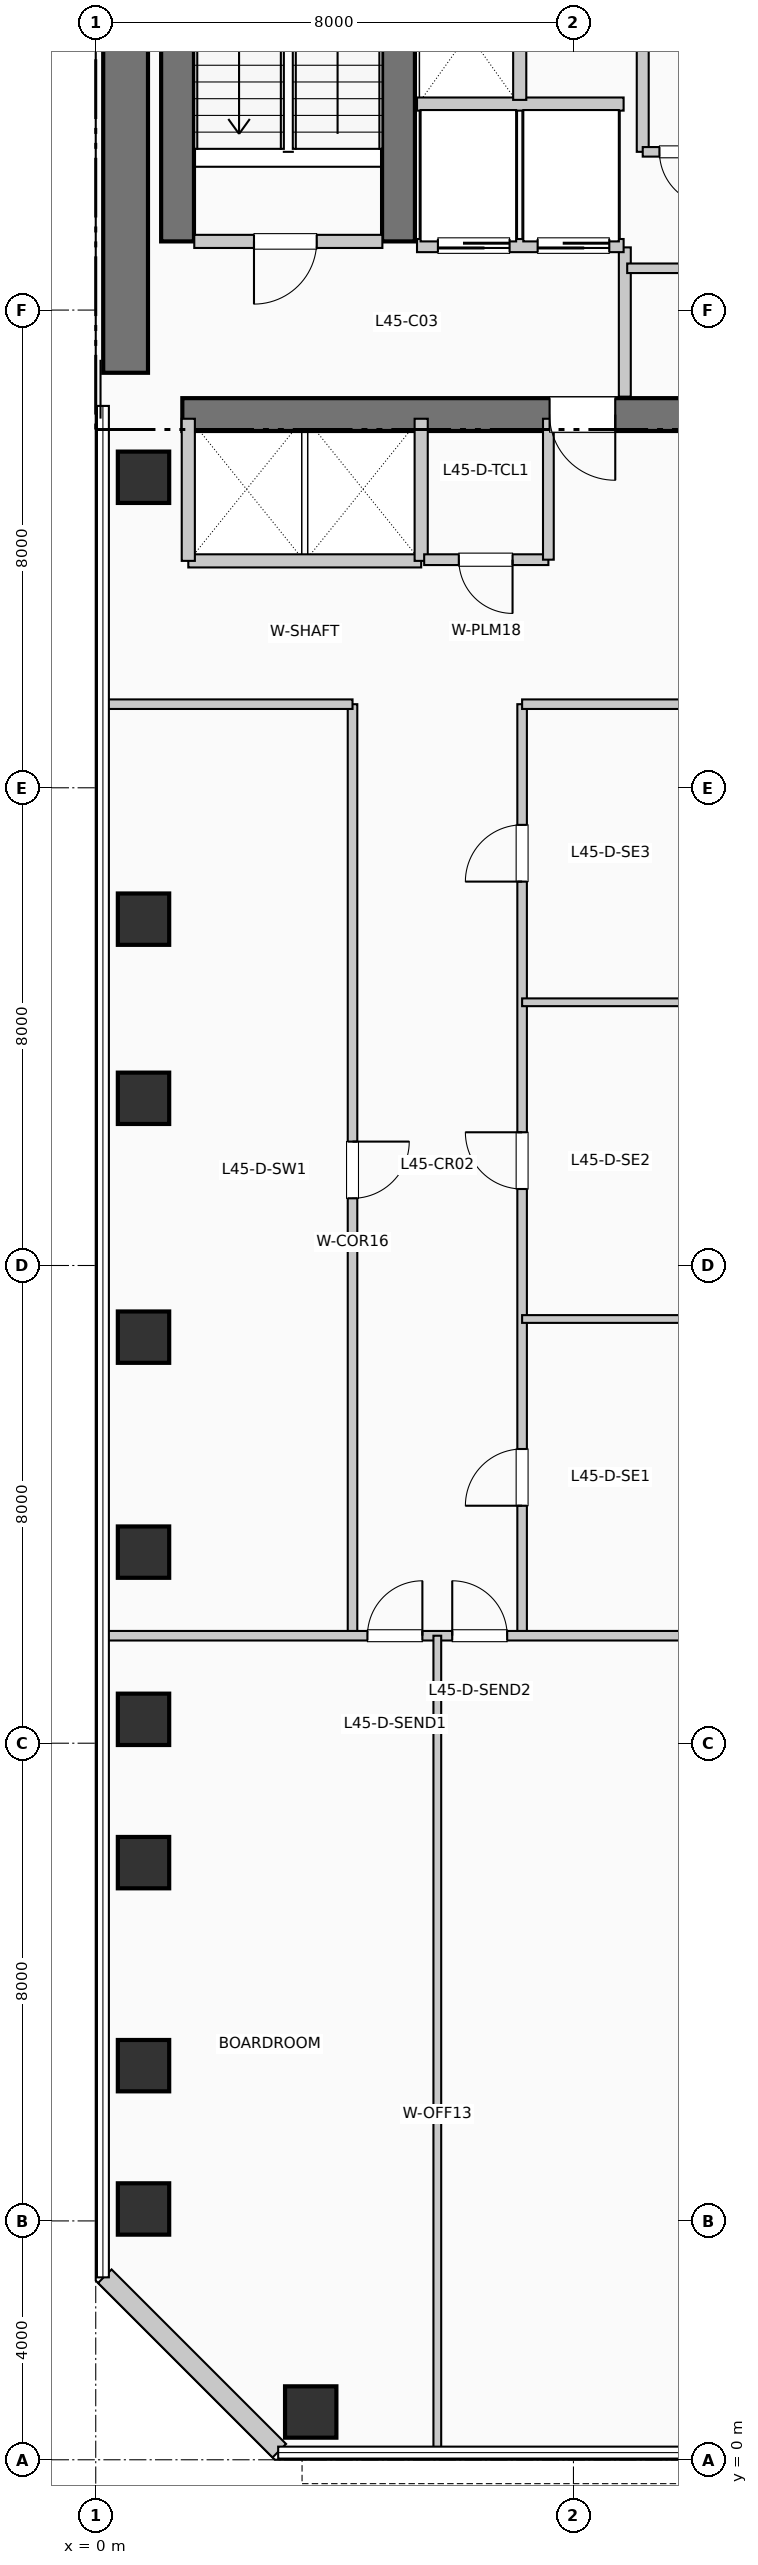
"""IFC4 building model, lengths in metres.
Left out: names, types, materials, properties, quantities, classifications, styles, units other than length and angle.
Written with IfcOpenShell. Run it as: python <this file> out.ifc"""

import sys

from ifc_helpers import new_model, si_unit, direction, frame, frame_2d, origin, origin_2d, place, context, subcontext, project, spatial, rectangle, extrude, element, fill, save


model = new_model("IFC4")
c1 = context("Model", 3, precision=1e-05, world=origin(), true_north=direction((0.0, 1.0)))
c2 = subcontext(c1, "Body", "Model", "MODEL_VIEW")
j1 = project(units=[si_unit("LENGTHUNIT", "METRE"), si_unit("PLANEANGLEUNIT", "RADIAN")], contexts=[c1])
p1 = place(None, origin())
s1 = spatial("IfcSite", under=j1, at=p1, CompositionType="ELEMENT")
p2 = place(p1, origin())
s2 = spatial("IfcBuilding", under=s1, at=p2, CompositionType="ELEMENT")
p3 = place(p2, frame((0.0, 0.0, 187.44)))
s3 = spatial("IfcBuildingStorey", under=s2, at=p3, CompositionType="ELEMENT", Elevation=187.44)
p4 = place(p3, frame((0.5, 34.95, 0.0), z_axis=(0.0, 0.0, 1.0), x_axis=(0.0, 1.0, 0.0)))
e1 = element("IfcWall", 1, at=p4, inside=s3, PredefinedType="SHEAR", context=c2, shape_type="SweptSolid", body=[
    extrude(rectangle(XDim=7.9, YDim=0.75, at=frame_2d((3.95, 0.0))), origin(), (0.0, 0.0, 1.0), 3.96),
])
p5 = place(p3, frame((1.45, 34.25, 0.0), z_axis=(0.0, 0.0, 1.0), x_axis=(1.0, 0.0, 0.0)))
e2 = element("IfcWall", 2, at=p5, inside=s3, PredefinedType="SHEAR", context=c2, shape_type="SweptSolid", body=[
    extrude(rectangle(XDim=10.71, YDim=0.55, at=frame_2d((5.355, 0.0))), origin(), (0.0, 0.0, 1.0), 3.96),
])
p6 = place(p5, frame((7.25, 0.0, 0.0), z_axis=(0.0, 0.0, 1.0), x_axis=(-1.0, 0.0, 0.0)))
e3 = element("IfcOpeningElement", 3, at=p6, cuts=e2, PredefinedType="OPENING", context=c2, shape_type="SweptSolid", body=[
    extrude(rectangle(XDim=1.1, YDim=2.15, at=frame_2d((0.55, 1.075))), frame((0.0, 0.285, 0.0), z_axis=(0.0, -1.0, 0.0), x_axis=(1.0, 0.0, 0.0)), (0.0, 0.0, 1.0), 0.57),
])
for number, where, z_axis, x_axis in (
    (4, (1.37, 37.15, 0.0), (0.0, 0.0, 1.0), (0.0, 1.0, 0.0)),
    (5, (5.07, 37.15, 0.0), (0.0, 0.0, 1.0), (0.0, 1.0, 0.0)),
):
    element("IfcWall", number, at=place(p3, frame(where, z_axis=z_axis, x_axis=x_axis)), inside=s3, PredefinedType="SHEAR", context=c2, shape_type="SweptSolid", body=[
        extrude(rectangle(XDim=7.89, YDim=0.55, at=frame_2d((3.945, 0.0))), origin(), (0.0, 0.0, 1.0), 3.96),
    ])
for number, where, z_axis, x_axis in (
    (6, (0.8, 4.2, 0.0), (0.0, 0.0, 1.0), (1.0, 0.0, 0.0)),
    (7, (0.8, 6.6, 0.0), (0.0, 0.0, 1.0), (1.0, 0.0, 0.0)),
    (8, (0.8, 10.0, 0.0), (0.0, 0.0, 1.0), (1.0, 0.0, 0.0)),
    (9, (0.8, 12.4, 0.0), (0.0, 0.0, 1.0), (1.0, 0.0, 0.0)),
    (10, (0.8, 15.2, 0.0), (0.0, 0.0, 1.0), (1.0, 0.0, 0.0)),
    (11, (0.8, 18.8, 0.0), (0.0, 0.0, 1.0), (1.0, 0.0, 0.0)),
    (12, (0.8, 22.8, 0.0), (0.0, 0.0, 1.0), (1.0, 0.0, 0.0)),
    (13, (0.8, 25.8, 0.0), (0.0, 0.0, 1.0), (1.0, 0.0, 0.0)),
    (14, (0.8, 33.2, 0.0), (0.0, 0.0, 1.0), (1.0, 0.0, 0.0)),
    (15, (3.6, 0.8, 0.0), (0.0, 0.0, 1.0), (1.0, 0.0, 0.0)),
):
    element("IfcColumn", number, at=place(p3, frame(where, z_axis=z_axis, x_axis=x_axis)), inside=s3, PredefinedType="COLUMN", context=c2, shape_type="SweptSolid", body=[
        extrude(rectangle(XDim=0.86, YDim=0.86, at=origin_2d()), origin(), (0.0, 0.0, 1.0), 3.96),
    ])
p7 = place(p3, frame((0.152, 3.074, 0.0), z_axis=(0.0, 0.0, 1.0), x_axis=(0.707106781187, -0.707106781187, 0.0)))
e16 = element("IfcWall", 16, at=p7, inside=s3, PredefinedType="SOLIDWALL", context=c2, shape_type="SweptSolid", body=[
    extrude(rectangle(XDim=4.133, YDim=0.32, at=frame_2d((2.066, 0.0))), origin(), (0.0, 0.0, 1.0), 3.71),
])
p8 = place(p3, frame((1.65, 37.15, 0.0), z_axis=(0.0, 0.0, 1.0), x_axis=(1.0, 0.0, 0.0)))
e17 = element("IfcWall", 17, at=p8, inside=s3, PredefinedType="PARTITIONING", context=c2, shape_type="SweptSolid", body=[
    extrude(rectangle(XDim=3.15, YDim=0.22, at=frame_2d((1.575, 0.0))), origin(), (0.0, 0.0, 1.0), 3.71),
])
p9 = place(p8, frame((2.05, 0.0, 0.0), z_axis=(0.0, 0.0, 1.0), x_axis=(-1.0, 0.0, 0.0)))
e18 = element("IfcOpeningElement", 18, at=p9, cuts=e17, PredefinedType="OPENING", context=c2, shape_type="SweptSolid", body=[
    extrude(rectangle(XDim=1.05, YDim=2.15, at=frame_2d((0.525, 1.075))), frame((0.0, 0.12, 0.0), z_axis=(0.0, -1.0, 0.0), x_axis=(1.0, 0.0, 0.0)), (0.0, 0.0, 1.0), 0.24),
])
p10 = place(p3, frame((8.86, 34.55, 0.0), z_axis=(0.0, 0.0, 1.0), x_axis=(0.0, 1.0, 0.0)))
e19 = element("IfcWall", 19, at=p10, inside=s3, PredefinedType="PARTITIONING", context=c2, shape_type="SweptSolid", body=[
    extrude(rectangle(XDim=2.5, YDim=0.2, at=frame_2d((1.25, 0.0))), origin(), (0.0, 0.0, 1.0), 3.71),
])
p11 = place(p3, frame((5.38, 37.08, 0.0), z_axis=(0.0, 0.0, 1.0), x_axis=(1.0, 0.0, 0.0)))
e20 = element("IfcWall", 20, at=p11, inside=s3, PredefinedType="PARTITIONING", context=c2, shape_type="SweptSolid", body=[
    extrude(rectangle(XDim=3.46, YDim=0.22, at=frame_2d((1.73, 0.0))), origin(), (0.0, 0.0, 1.0), 3.71),
])
p12 = place(p11, frame((1.55, 0.0, 0.0), z_axis=(0.0, 0.0, 1.0), x_axis=(-1.0, 0.0, 0.0)))
e21 = element("IfcOpeningElement", 21, at=p12, cuts=e20, PredefinedType="OPENING", context=c2, shape_type="SweptSolid", body=[
    extrude(rectangle(XDim=1.2, YDim=2.2, at=frame_2d((0.6, 1.1))), frame((0.0, 0.12, 0.0), z_axis=(0.0, -1.0, 0.0), x_axis=(1.0, 0.0, 0.0)), (0.0, 0.0, 1.0), 0.24),
])
p13 = place(p11, frame((3.22, 0.0, 0.0), z_axis=(0.0, 0.0, 1.0), x_axis=(-1.0, 0.0, 0.0)))
e22 = element("IfcOpeningElement", 22, at=p13, cuts=e20, PredefinedType="OPENING", context=c2, shape_type="SweptSolid", body=[
    extrude(rectangle(XDim=1.2, YDim=2.2, at=frame_2d((0.6, 1.1))), frame((0.0, 0.12, 0.0), z_axis=(0.0, -1.0, 0.0), x_axis=(1.0, 0.0, 0.0)), (0.0, 0.0, 1.0), 0.24),
])
p14 = place(p3, frame((5.38, 39.45, 0.0), z_axis=(0.0, 0.0, 1.0), x_axis=(1.0, 0.0, 0.0)))
e23 = element("IfcWall", 23, at=p14, inside=s3, PredefinedType="PARTITIONING", context=c2, shape_type="SweptSolid", body=[
    extrude(rectangle(XDim=3.46, YDim=0.22, at=frame_2d((1.73, 0.0))), origin(), (0.0, 0.0, 1.0), 3.71),
])
p15 = place(p3, frame((7.1, 39.52, 0.0), z_axis=(0.0, 0.0, 1.0), x_axis=(0.0, 1.0, 0.0)))
e24 = element("IfcWall", 24, at=p15, inside=s3, PredefinedType="PARTITIONING", context=c2, shape_type="SweptSolid", body=[
    extrude(rectangle(XDim=2.93, YDim=0.22, at=frame_2d((1.465, 0.0))), origin(), (0.0, 0.0, 1.0), 3.71),
])
p16 = place(p3, frame((1.55, 31.8, 0.0), z_axis=(0.0, 0.0, 1.0), x_axis=(1.0, 0.0, 0.0)))
e25 = element("IfcWall", 25, at=p16, inside=s3, PredefinedType="PARTITIONING", context=c2, shape_type="SweptSolid", body=[
    extrude(rectangle(XDim=3.9, YDim=0.22, at=frame_2d((1.95, 0.0))), origin(), (0.0, 0.0, 1.0), 3.71),
])
for number, where, z_axis, x_axis in (
    (26, (1.55, 31.8, 0.0), (0.0, 0.0, 1.0), (0.0, 1.0, 0.0)),
    (27, (5.45, 31.8, 0.0), (0.0, 0.0, 1.0), (0.0, 1.0, 0.0)),
):
    element("IfcWall", number, at=place(p3, frame(where, z_axis=z_axis, x_axis=x_axis)), inside=s3, PredefinedType="PARTITIONING", context=c2, shape_type="SweptSolid", body=[
        extrude(rectangle(XDim=2.38, YDim=0.22, at=frame_2d((1.19, 0.0))), origin(), (0.0, 0.0, 1.0), 3.71),
    ])
p17 = place(p3, frame((9.16, 38.65, 0.0), z_axis=(0.0, 0.0, 1.0), x_axis=(0.0, 1.0, 0.0)))
e28 = element("IfcWall", 28, at=p17, inside=s3, PredefinedType="PARTITIONING", context=c2, shape_type="SweptSolid", body=[
    extrude(rectangle(XDim=2.35, YDim=0.2, at=frame_2d((1.175, 0.0))), origin(), (0.0, 0.0, 1.0), 3.71),
])
p18 = place(p3, frame((5.5, 31.82, 0.0), z_axis=(0.0, 0.0, 1.0), x_axis=(1.0, 0.0, 0.0)))
e29 = element("IfcWall", 29, at=p18, inside=s3, PredefinedType="PLUMBINGWALL", context=c2, shape_type="SweptSolid", body=[
    extrude(rectangle(XDim=2.08, YDim=0.18, at=frame_2d((1.04, 0.0))), origin(), (0.0, 0.0, 1.0), 3.71),
])
p19 = place(p18, frame((1.48, 0.0, 0.0), z_axis=(0.0, 0.0, 1.0), x_axis=(-1.0, 0.0, 0.0)))
e30 = element("IfcOpeningElement", 30, at=p19, cuts=e29, PredefinedType="OPENING", context=c2, shape_type="SweptSolid", body=[
    extrude(rectangle(XDim=0.9, YDim=2.1, at=frame_2d((0.45, 1.05))), frame((0.0, 0.1, 0.0), z_axis=(0.0, -1.0, 0.0), x_axis=(1.0, 0.0, 0.0)), (0.0, 0.0, 1.0), 0.2),
])
p20 = place(p3, frame((7.58, 31.82, 0.0), z_axis=(0.0, 0.0, 1.0), x_axis=(0.0, 1.0, 0.0)))
e31 = element("IfcWall", 31, at=p20, inside=s3, PredefinedType="PLUMBINGWALL", context=c2, shape_type="SweptSolid", body=[
    extrude(rectangle(XDim=2.36, YDim=0.18, at=frame_2d((1.18, 0.0))), origin(), (0.0, 0.0, 1.0), 3.71),
])
p21 = place(p3, frame((8.9, 36.7, 0.0), z_axis=(0.0, 0.0, 1.0), x_axis=(1.0, 0.0, 0.0)))
e32 = element("IfcWall", 32, at=p21, inside=s3, PredefinedType="PARTITIONING", context=c2, shape_type="SweptSolid", body=[
    extrude(rectangle(XDim=3.25, YDim=0.16, at=frame_2d((1.625, 0.0))), origin(), (0.0, 0.0, 1.0), 3.71),
])
p22 = place(p21, frame((1.1, 0.0, 0.0)))
e33 = element("IfcOpeningElement", 33, at=p22, cuts=e32, PredefinedType="OPENING", context=c2, shape_type="SweptSolid", body=[
    extrude(rectangle(XDim=0.95, YDim=2.15, at=frame_2d((0.475, 1.075))), frame((0.0, 0.09, 0.0), z_axis=(0.0, -1.0, 0.0), x_axis=(1.0, 0.0, 0.0)), (0.0, 0.0, 1.0), 0.18),
])
p23 = place(p3, frame((9.16, 38.65, 0.0), z_axis=(0.0, 0.0, 1.0), x_axis=(1.0, 0.0, 0.0)))
e34 = element("IfcWall", 34, at=p23, inside=s3, PredefinedType="PARTITIONING", context=c2, shape_type="SweptSolid", body=[
    extrude(rectangle(XDim=3.42, YDim=0.16, at=frame_2d((1.71, 0.0))), origin(), (0.0, 0.0, 1.0), 3.71),
])
p24 = place(p23, frame((1.18, 0.0, 0.0), z_axis=(0.0, 0.0, 1.0), x_axis=(-1.0, 0.0, 0.0)))
e35 = element("IfcOpeningElement", 35, at=p24, cuts=e34, PredefinedType="OPENING", context=c2, shape_type="SweptSolid", body=[
    extrude(rectangle(XDim=0.9, YDim=2.15, at=frame_2d((0.45, 1.075))), frame((0.0, 0.09, 0.0), z_axis=(0.0, -1.0, 0.0), x_axis=(1.0, 0.0, 0.0)), (0.0, 0.0, 1.0), 0.18),
])
p25 = place(p23, frame((2.6, 0.0, 0.0), z_axis=(0.0, 0.0, 1.0), x_axis=(-1.0, 0.0, 0.0)))
e36 = element("IfcOpeningElement", 36, at=p25, cuts=e34, PredefinedType="OPENING", context=c2, shape_type="SweptSolid", body=[
    extrude(rectangle(XDim=0.9, YDim=2.15, at=frame_2d((0.45, 1.075))), frame((0.0, 0.09, 0.0), z_axis=(0.0, -1.0, 0.0), x_axis=(1.0, 0.0, 0.0)), (0.0, 0.0, 1.0), 0.18),
])
p26 = place(p3, frame((4.3, 13.8, 0.0), z_axis=(0.0, 0.0, 1.0), x_axis=(0.0, 1.0, 0.0)))
e37 = element("IfcWall", 37, at=p26, inside=s3, PredefinedType="PARTITIONING", context=c2, shape_type="SweptSolid", body=[
    extrude(rectangle(XDim=15.6, YDim=0.16, at=frame_2d((7.8, 0.0))), origin(), (0.0, 0.0, 1.0), 3.71),
])
p27 = place(p26, frame((8.275, 0.0, 0.0), z_axis=(0.0, 0.0, 1.0), x_axis=(-1.0, 0.0, 0.0)))
e38 = element("IfcOpeningElement", 38, at=p27, cuts=e37, PredefinedType="OPENING", context=c2, shape_type="SweptSolid", body=[
    extrude(rectangle(XDim=0.95, YDim=2.15, at=frame_2d((0.475, 1.075))), frame((0.0, 0.09, 0.0), z_axis=(0.0, -1.0, 0.0), x_axis=(1.0, 0.0, 0.0)), (0.0, 0.0, 1.0), 0.18),
])
p28 = place(p3, frame((7.14, 13.8, 0.0), z_axis=(0.0, 0.0, 1.0), x_axis=(0.0, 1.0, 0.0)))
e39 = element("IfcWall", 39, at=p28, inside=s3, PredefinedType="PARTITIONING", context=c2, shape_type="SweptSolid", body=[
    extrude(rectangle(XDim=15.6, YDim=0.16, at=frame_2d((7.8, 0.0))), origin(), (0.0, 0.0, 1.0), 3.71),
])
p29 = place(p28, frame((2.177, 0.0, 0.0)))
e40 = element("IfcOpeningElement", 40, at=p29, cuts=e39, PredefinedType="OPENING", context=c2, shape_type="SweptSolid", body=[
    extrude(rectangle(XDim=0.95, YDim=2.15, at=frame_2d((0.475, 1.075))), frame((0.0, 0.09, 0.0), z_axis=(0.0, -1.0, 0.0), x_axis=(1.0, 0.0, 0.0)), (0.0, 0.0, 1.0), 0.18),
])
p30 = place(p28, frame((7.481, 0.0, 0.0)))
e41 = element("IfcOpeningElement", 41, at=p30, cuts=e39, PredefinedType="OPENING", context=c2, shape_type="SweptSolid", body=[
    extrude(rectangle(XDim=0.95, YDim=2.15, at=frame_2d((0.475, 1.075))), frame((0.0, 0.09, 0.0), z_axis=(0.0, -1.0, 0.0), x_axis=(1.0, 0.0, 0.0)), (0.0, 0.0, 1.0), 0.18),
])
p31 = place(p28, frame((12.629, 0.0, 0.0)))
e42 = element("IfcOpeningElement", 42, at=p31, cuts=e39, PredefinedType="OPENING", context=c2, shape_type="SweptSolid", body=[
    extrude(rectangle(XDim=0.95, YDim=2.15, at=frame_2d((0.475, 1.075))), frame((0.0, 0.09, 0.0), z_axis=(0.0, -1.0, 0.0), x_axis=(1.0, 0.0, 0.0)), (0.0, 0.0, 1.0), 0.18),
])
p32 = place(p3, frame((0.19, 13.8, 0.0), z_axis=(0.0, 0.0, 1.0), x_axis=(1.0, 0.0, 0.0)))
e43 = element("IfcWall", 43, at=p32, inside=s3, PredefinedType="PARTITIONING", context=c2, shape_type="SweptSolid", body=[
    extrude(rectangle(XDim=23.26, YDim=0.16, at=frame_2d((11.63, 0.0))), origin(), (0.0, 0.0, 1.0), 3.71),
])
p33 = place(p32, frame((4.36, 0.0, 0.0)))
e44 = element("IfcOpeningElement", 44, at=p33, cuts=e43, PredefinedType="OPENING", context=c2, shape_type="SweptSolid", body=[
    extrude(rectangle(XDim=0.92, YDim=2.1, at=frame_2d((0.46, 1.05))), frame((0.0, 0.09, 0.0), z_axis=(0.0, -1.0, 0.0), x_axis=(1.0, 0.0, 0.0)), (0.0, 0.0, 1.0), 0.18),
])
p34 = place(p32, frame((5.78, 0.0, 0.0)))
e45 = element("IfcOpeningElement", 45, at=p34, cuts=e43, PredefinedType="OPENING", context=c2, shape_type="SweptSolid", body=[
    extrude(rectangle(XDim=0.92, YDim=2.1, at=frame_2d((0.46, 1.05))), frame((0.0, 0.09, 0.0), z_axis=(0.0, -1.0, 0.0), x_axis=(1.0, 0.0, 0.0)), (0.0, 0.0, 1.0), 0.18),
])
p35 = place(p3, frame((0.19, 29.4, 0.0), z_axis=(0.0, 0.0, 1.0), x_axis=(1.0, 0.0, 0.0)))
e46 = element("IfcWall", 46, at=p35, inside=s3, PredefinedType="PARTITIONING", context=c2, shape_type="SweptSolid", body=[
    extrude(rectangle(XDim=4.11, YDim=0.16, at=frame_2d((2.055, 0.0))), origin(), (0.0, 0.0, 1.0), 3.365),
])
p36 = place(p3, frame((7.14, 29.4, 0.0), z_axis=(0.0, 0.0, 1.0), x_axis=(1.0, 0.0, 0.0)))
e47 = element("IfcWall", 47, at=p36, inside=s3, PredefinedType="PARTITIONING", context=c2, shape_type="SweptSolid", body=[
    extrude(rectangle(XDim=16.31, YDim=0.16, at=frame_2d((8.155, 0.0))), origin(), (0.0, 0.0, 1.0), 3.365),
])
p37 = place(p3, frame((5.72, 0.19, 0.0), z_axis=(0.0, 0.0, 1.0), x_axis=(0.0, 1.0, 0.0)))
e48 = element("IfcWall", 48, at=p37, inside=s3, PredefinedType="PARTITIONING", context=c2, shape_type="SweptSolid", body=[
    extrude(rectangle(XDim=13.61, YDim=0.13, at=frame_2d((6.805, 0.0))), origin(), (0.0, 0.0, 1.0), 3.71),
])
p38 = place(p3, frame((7.14, 19.104, 0.0), z_axis=(0.0, 0.0, 1.0), x_axis=(1.0, 0.0, 0.0)))
e49 = element("IfcWall", 49, at=p38, inside=s3, PredefinedType="PARTITIONING", context=c2, shape_type="SweptSolid", body=[
    extrude(rectangle(XDim=16.31, YDim=0.13, at=frame_2d((8.155, 0.0))), origin(), (0.0, 0.0, 1.0), 3.045),
])
p39 = place(p3, frame((7.14, 24.408, 0.0), z_axis=(0.0, 0.0, 1.0), x_axis=(1.0, 0.0, 0.0)))
e50 = element("IfcWall", 50, at=p39, inside=s3, PredefinedType="PARTITIONING", context=c2, shape_type="SweptSolid", body=[
    extrude(rectangle(XDim=16.31, YDim=0.13, at=frame_2d((8.155, 0.0))), origin(), (0.0, 0.0, 1.0), 3.71),
])
p40 = place(p9, origin())
e51 = element("IfcDoor", 51, at=p40, inside=s3, OperationType="SINGLE_SWING_LEFT", PredefinedType="DOOR", context=c2, shape_type="SweptSolid", body=[
    extrude(rectangle(XDim=1.05, YDim=2.15, at=frame_2d((0.525, 1.075))), frame((0.0, 0.025, 0.0), z_axis=(0.0, -1.0, 0.0), x_axis=(1.0, 0.0, 0.0)), (0.0, 0.0, 1.0), 0.05),
])
fill(e18, e51)
p41 = place(p6, origin())
e52 = element("IfcDoor", 52, at=p41, inside=s3, OperationType="SINGLE_SWING_RIGHT", PredefinedType="DOOR", context=c2, shape_type="SweptSolid", body=[
    extrude(rectangle(XDim=1.1, YDim=2.15, at=frame_2d((0.55, 1.075))), frame((0.0, 0.025, 0.0), z_axis=(0.0, -1.0, 0.0), x_axis=(1.0, 0.0, 0.0)), (0.0, 0.0, 1.0), 0.05),
])
fill(e3, e52)
p42 = place(p12, origin())
e53 = element("IfcDoor", 53, at=p42, inside=s3, OperationType="SLIDING_TO_RIGHT", PredefinedType="DOOR", context=c2, shape_type="SweptSolid", body=[
    extrude(rectangle(XDim=1.2, YDim=2.2, at=frame_2d((0.6, 1.1))), frame((0.0, 0.025, 0.0), z_axis=(0.0, -1.0, 0.0), x_axis=(1.0, 0.0, 0.0)), (0.0, 0.0, 1.0), 0.05),
])
fill(e21, e53)
p43 = place(p13, origin())
e54 = element("IfcDoor", 54, at=p43, inside=s3, OperationType="SLIDING_TO_RIGHT", PredefinedType="DOOR", context=c2, shape_type="SweptSolid", body=[
    extrude(rectangle(XDim=1.2, YDim=2.2, at=frame_2d((0.6, 1.1))), frame((0.0, 0.025, 0.0), z_axis=(0.0, -1.0, 0.0), x_axis=(1.0, 0.0, 0.0)), (0.0, 0.0, 1.0), 0.05),
])
fill(e22, e54)
p44 = place(p19, origin())
e55 = element("IfcDoor", 55, at=p44, inside=s3, OperationType="SINGLE_SWING_RIGHT", PredefinedType="DOOR", context=c2, shape_type="SweptSolid", body=[
    extrude(rectangle(XDim=0.9, YDim=2.1, at=frame_2d((0.45, 1.05))), frame((0.0, 0.025, 0.0), z_axis=(0.0, -1.0, 0.0), x_axis=(1.0, 0.0, 0.0)), (0.0, 0.0, 1.0), 0.05),
])
fill(e30, e55)
p45 = place(p24, origin())
e56 = element("IfcDoor", 56, at=p45, inside=s3, OperationType="SINGLE_SWING_RIGHT", PredefinedType="DOOR", context=c2, shape_type="SweptSolid", body=[
    extrude(rectangle(XDim=0.9, YDim=2.15, at=frame_2d((0.45, 1.075))), frame((0.0, 0.025, 0.0), z_axis=(0.0, -1.0, 0.0), x_axis=(1.0, 0.0, 0.0)), (0.0, 0.0, 1.0), 0.05),
])
fill(e35, e56)
p46 = place(p33, origin())
e57 = element("IfcDoor", 57, at=p46, inside=s3, OperationType="SINGLE_SWING_RIGHT", PredefinedType="DOOR", context=c2, shape_type="SweptSolid", body=[
    extrude(rectangle(XDim=0.92, YDim=2.1, at=frame_2d((0.46, 1.05))), frame((0.0, 0.025, 0.0), z_axis=(0.0, -1.0, 0.0), x_axis=(1.0, 0.0, 0.0)), (0.0, 0.0, 1.0), 0.05),
])
fill(e44, e57)
p47 = place(p34, origin())
e58 = element("IfcDoor", 58, at=p47, inside=s3, OperationType="SINGLE_SWING_LEFT", PredefinedType="DOOR", context=c2, shape_type="SweptSolid", body=[
    extrude(rectangle(XDim=0.92, YDim=2.1, at=frame_2d((0.46, 1.05))), frame((0.0, 0.025, 0.0), z_axis=(0.0, -1.0, 0.0), x_axis=(1.0, 0.0, 0.0)), (0.0, 0.0, 1.0), 0.05),
])
fill(e45, e58)
p48 = place(p27, origin())
e59 = element("IfcDoor", 59, at=p48, inside=s3, OperationType="SINGLE_SWING_RIGHT", PredefinedType="DOOR", context=c2, shape_type="SweptSolid", body=[
    extrude(rectangle(XDim=0.95, YDim=2.15, at=frame_2d((0.475, 1.075))), frame((0.0, 0.025, 0.0), z_axis=(0.0, -1.0, 0.0), x_axis=(1.0, 0.0, 0.0)), (0.0, 0.0, 1.0), 0.05),
])
fill(e38, e59)
p49 = place(p29, origin())
e60 = element("IfcDoor", 60, at=p49, inside=s3, OperationType="SINGLE_SWING_LEFT", PredefinedType="DOOR", context=c2, shape_type="SweptSolid", body=[
    extrude(rectangle(XDim=0.95, YDim=2.15, at=frame_2d((0.475, 1.075))), frame((0.0, 0.025, 0.0), z_axis=(0.0, -1.0, 0.0), x_axis=(1.0, 0.0, 0.0)), (0.0, 0.0, 1.0), 0.05),
])
fill(e40, e60)
p50 = place(p30, origin())
e61 = element("IfcDoor", 61, at=p50, inside=s3, OperationType="SINGLE_SWING_RIGHT", PredefinedType="DOOR", context=c2, shape_type="SweptSolid", body=[
    extrude(rectangle(XDim=0.95, YDim=2.15, at=frame_2d((0.475, 1.075))), frame((0.0, 0.025, 0.0), z_axis=(0.0, -1.0, 0.0), x_axis=(1.0, 0.0, 0.0)), (0.0, 0.0, 1.0), 0.05),
])
fill(e41, e61)
p51 = place(p31, origin())
e62 = element("IfcDoor", 62, at=p51, inside=s3, OperationType="SINGLE_SWING_LEFT", PredefinedType="DOOR", context=c2, shape_type="SweptSolid", body=[
    extrude(rectangle(XDim=0.95, YDim=2.15, at=frame_2d((0.475, 1.075))), frame((0.0, 0.025, 0.0), z_axis=(0.0, -1.0, 0.0), x_axis=(1.0, 0.0, 0.0)), (0.0, 0.0, 1.0), 0.05),
])
fill(e42, e62)
save(model, sys.argv[1])
